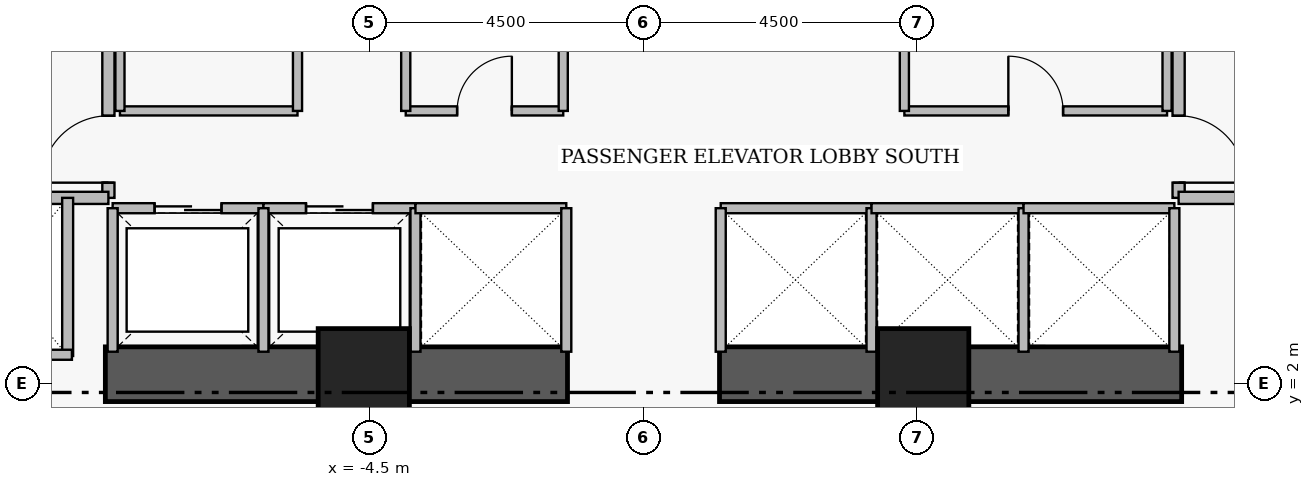
"""IFC4 building model, lengths in metres.
Left out: names, types, materials, properties, quantities, classifications, styles, units other than length and angle.
Written with IfcOpenShell. Run it as: python <this file> out.ifc"""

import sys

from ifc_helpers import new_model, si_unit, direction, frame, frame_2d, origin, origin_2d, place, context, subcontext, project, spatial, rectangle, extrude, element, fill, save


model = new_model("IFC4")
c1 = context("Model", 3, precision=1e-05, world=origin(), true_north=direction((0.0, 1.0)))
c2 = subcontext(c1, "Body", "Model", "MODEL_VIEW")
j1 = project(units=[si_unit("LENGTHUNIT", "METRE"), si_unit("PLANEANGLEUNIT", "RADIAN")], contexts=[c1])
p1 = place(None, origin())
s1 = spatial("IfcSite", under=j1, at=p1, CompositionType="ELEMENT")
p2 = place(p1, origin())
s2 = spatial("IfcBuilding", under=s1, at=p2, CompositionType="ELEMENT")
p3 = place(p2, frame((0.0, 0.0, 27.6)))
s3 = spatial("IfcBuildingStorey", under=s2, at=p3, CompositionType="ELEMENT", Elevation=27.6)
for number, where, z_axis, x_axis in (
    (1, (-8.85, 2.15, 0.0), (0.0, 0.0, 1.0), (1.0, 0.0, 0.0)),
    (2, (1.25, 2.15, 0.0), (0.0, 0.0, 1.0), (1.0, 0.0, 0.0)),
):
    element("IfcWall", number, at=place(p3, frame(where, z_axis=z_axis, x_axis=x_axis)), inside=s3, PredefinedType="SHEAR", context=c2, shape_type="SweptSolid", body=[
        extrude(rectangle(XDim=7.6, YDim=0.9, at=frame_2d((3.8, 0.0))), origin(), (0.0, 0.0, 1.0), 3.43),
    ])
for number, where, z_axis, x_axis in (
    (3, (-4.6, 2.15, 0.0), (0.0, 0.0, 1.0), (1.0, 0.0, 0.0)),
    (4, (4.6, 2.15, 0.0), (0.0, 0.0, 1.0), (1.0, 0.0, 0.0)),
):
    element("IfcColumn", number, at=place(p3, frame(where, z_axis=z_axis, x_axis=x_axis)), inside=s3, PredefinedType="COLUMN", context=c2, shape_type="SweptSolid", body=[
        extrude(rectangle(XDim=1.5, YDim=1.5, at=origin_2d()), origin(), (0.0, 0.0, 1.0), 3.65),
    ])
p4 = place(p3, frame((-8.8, 5.05, 0.0), z_axis=(0.0, 0.0, 1.0), x_axis=(0.0, 1.0, 0.0)))
e5 = element("IfcWall", 5, at=p4, inside=s3, PredefinedType="PARTITIONING", context=c2, shape_type="SweptSolid", body=[
    extrude(rectangle(XDim=6.1, YDim=0.2, at=frame_2d((3.05, 0.0))), origin(), (0.0, 0.0, 1.0), 3.43),
])
p5 = place(p4, frame((0.25, 0.0, 0.0)))
e6 = element("IfcOpeningElement", 6, at=p5, cuts=e5, PredefinedType="OPENING", context=c2, shape_type="SweptSolid", body=[
    extrude(rectangle(XDim=1.1, YDim=2.2, at=frame_2d((0.55, 1.1))), frame((0.0, 0.11, 0.0), z_axis=(0.0, -1.0, 0.0), x_axis=(1.0, 0.0, 0.0)), (0.0, 0.0, 1.0), 0.22),
])
p6 = place(p4, frame((3.85, 0.0, 0.0)))
e7 = element("IfcOpeningElement", 7, at=p6, cuts=e5, PredefinedType="OPENING", context=c2, shape_type="SweptSolid", body=[
    extrude(rectangle(XDim=1.1, YDim=2.2, at=frame_2d((0.55, 1.1))), frame((0.0, 0.11, 0.0), z_axis=(0.0, -1.0, 0.0), x_axis=(1.0, 0.0, 0.0)), (0.0, 0.0, 1.0), 0.22),
])
p7 = place(p3, frame((8.8, 11.15, 0.0), z_axis=(0.0, 0.0, 1.0), x_axis=(0.0, -1.0, 0.0)))
e8 = element("IfcWall", 8, at=p7, inside=s3, PredefinedType="PARTITIONING", context=c2, shape_type="SweptSolid", body=[
    extrude(rectangle(XDim=6.1, YDim=0.2, at=frame_2d((3.05, 0.0))), origin(), (0.0, 0.0, 1.0), 3.43),
])
p8 = place(p7, frame((1.15, 0.0, 0.0)))
e9 = element("IfcOpeningElement", 9, at=p8, cuts=e8, PredefinedType="OPENING", context=c2, shape_type="SweptSolid", body=[
    extrude(rectangle(XDim=1.1, YDim=2.2, at=frame_2d((0.55, 1.1))), frame((0.0, 0.11, 0.0), z_axis=(0.0, -1.0, 0.0), x_axis=(1.0, 0.0, 0.0)), (0.0, 0.0, 1.0), 0.22),
])
p9 = place(p7, frame((4.75, 0.0, 0.0)))
e10 = element("IfcOpeningElement", 10, at=p9, cuts=e8, PredefinedType="OPENING", context=c2, shape_type="SweptSolid", body=[
    extrude(rectangle(XDim=1.1, YDim=2.2, at=frame_2d((0.55, 1.1))), frame((0.0, 0.11, 0.0), z_axis=(0.0, -1.0, 0.0), x_axis=(1.0, 0.0, 0.0)), (0.0, 0.0, 1.0), 0.22),
])
p10 = place(p3, frame((-8.73, 4.88, 0.0), z_axis=(0.0, 0.0, 1.0), x_axis=(1.0, 0.0, 0.0)))
e11 = element("IfcWall", 11, at=p10, inside=s3, PredefinedType="PARTITIONING", context=c2, shape_type="SweptSolid", body=[
    extrude(rectangle(XDim=2.48, YDim=0.165, at=frame_2d((1.24, 0.0))), origin(), (0.0, 0.0, 1.0), 3.43),
])
p11 = place(p10, frame((0.69, 0.0, 0.0)))
e12 = element("IfcOpeningElement", 12, at=p11, cuts=e11, PredefinedType="OPENING", context=c2, shape_type="SweptSolid", body=[
    extrude(rectangle(XDim=1.1, YDim=2.25, at=frame_2d((0.55, 1.125))), frame((0.0, 0.093, 0.0), z_axis=(0.0, -1.0, 0.0), x_axis=(1.0, 0.0, 0.0)), (0.0, 0.0, 1.0), 0.185),
])
p12 = place(p3, frame((-6.25, 4.88, 0.0), z_axis=(0.0, 0.0, 1.0), x_axis=(1.0, 0.0, 0.0)))
e13 = element("IfcWall", 13, at=p12, inside=s3, PredefinedType="PARTITIONING", context=c2, shape_type="SweptSolid", body=[
    extrude(rectangle(XDim=2.5, YDim=0.165, at=frame_2d((1.25, 0.0))), origin(), (0.0, 0.0, 1.0), 3.43),
])
p13 = place(p12, frame((0.7, 0.0, 0.0)))
e14 = element("IfcOpeningElement", 14, at=p13, cuts=e13, PredefinedType="OPENING", context=c2, shape_type="SweptSolid", body=[
    extrude(rectangle(XDim=1.1, YDim=2.25, at=frame_2d((0.55, 1.125))), frame((0.0, 0.093, 0.0), z_axis=(0.0, -1.0, 0.0), x_axis=(1.0, 0.0, 0.0)), (0.0, 0.0, 1.0), 0.185),
])
p14 = place(p3, frame((-3.91, 6.48, 0.0), z_axis=(0.0, 0.0, 1.0), x_axis=(1.0, 0.0, 0.0)))
e15 = element("IfcWall", 15, at=p14, inside=s3, PredefinedType="PARTITIONING", context=c2, shape_type="SweptSolid", body=[
    extrude(rectangle(XDim=2.59, YDim=0.15, at=frame_2d((1.295, 0.0))), origin(), (0.0, 0.0, 1.0), 3.43),
])
p15 = place(p14, frame((0.845, 0.0, 0.0)))
e16 = element("IfcOpeningElement", 16, at=p15, cuts=e15, PredefinedType="OPENING", context=c2, shape_type="SweptSolid", body=[
    extrude(rectangle(XDim=0.9, YDim=2.15, at=frame_2d((0.45, 1.075))), frame((0.0, 0.085, 0.0), z_axis=(0.0, -1.0, 0.0), x_axis=(1.0, 0.0, 0.0)), (0.0, 0.0, 1.0), 0.17),
])
p16 = place(p3, frame((4.29, 6.48, 0.0), z_axis=(0.0, 0.0, 1.0), x_axis=(1.0, 0.0, 0.0)))
e17 = element("IfcWall", 17, at=p16, inside=s3, PredefinedType="PARTITIONING", context=c2, shape_type="SweptSolid", body=[
    extrude(rectangle(XDim=4.32, YDim=0.15, at=frame_2d((2.16, 0.0))), origin(), (0.0, 0.0, 1.0), 3.43),
])
p17 = place(p16, frame((1.71, 0.0, 0.0)))
e18 = element("IfcOpeningElement", 18, at=p17, cuts=e17, PredefinedType="OPENING", context=c2, shape_type="SweptSolid", body=[
    extrude(rectangle(XDim=0.9, YDim=2.15, at=frame_2d((0.45, 1.075))), frame((0.0, 0.085, 0.0), z_axis=(0.0, -1.0, 0.0), x_axis=(1.0, 0.0, 0.0)), (0.0, 0.0, 1.0), 0.17),
])
for number, where, z_axis, x_axis in (
    (19, (-11.65, 5.05, 0.0), (0.0, 0.0, 1.0), (1.0, 0.0, 0.0)),
    (20, (8.8, 5.05, 0.0), (0.0, 0.0, 1.0), (1.0, 0.0, 0.0)),
):
    element("IfcWall", number, at=place(p3, frame(where, z_axis=z_axis, x_axis=x_axis)), inside=s3, PredefinedType="PARTITIONING", context=c2, shape_type="SweptSolid", body=[
        extrude(rectangle(XDim=2.85, YDim=0.2, at=frame_2d((1.425, 0.0))), origin(), (0.0, 0.0, 1.0), 3.43),
    ])
for number, where, z_axis, x_axis in (
    (21, (-8.73, 2.52, 0.0), (0.0, 0.0, 1.0), (0.0, 1.0, 0.0)),
    (22, (-6.25, 2.52, 0.0), (0.0, 0.0, 1.0), (0.0, 1.0, 0.0)),
    (23, (-3.75, 2.52, 0.0), (0.0, 0.0, 1.0), (0.0, 1.0, 0.0)),
):
    element("IfcWall", number, at=place(p3, frame(where, z_axis=z_axis, x_axis=x_axis)), inside=s3, PredefinedType="PARTITIONING", context=c2, shape_type="SweptSolid", body=[
        extrude(rectangle(XDim=2.36, YDim=0.165, at=frame_2d((1.18, 0.0))), origin(), (0.0, 0.0, 1.0), 3.43),
    ])
p18 = place(p3, frame((-3.75, 4.88, 0.0), z_axis=(0.0, 0.0, 1.0), x_axis=(1.0, 0.0, 0.0)))
e24 = element("IfcWall", 24, at=p18, inside=s3, PredefinedType="PARTITIONING", context=c2, shape_type="SweptSolid", body=[
    extrude(rectangle(XDim=2.48, YDim=0.165, at=frame_2d((1.24, 0.0))), origin(), (0.0, 0.0, 1.0), 3.43),
])
p19 = place(p3, frame((-1.27, 2.52, 0.0), z_axis=(0.0, 0.0, 1.0), x_axis=(0.0, 1.0, 0.0)))
e25 = element("IfcWall", 25, at=p19, inside=s3, PredefinedType="PARTITIONING", context=c2, shape_type="SweptSolid", body=[
    extrude(rectangle(XDim=2.36, YDim=0.165, at=frame_2d((1.18, 0.0))), origin(), (0.0, 0.0, 1.0), 3.43),
])
p20 = place(p3, frame((1.27, 4.88, 0.0), z_axis=(0.0, 0.0, 1.0), x_axis=(1.0, 0.0, 0.0)))
e26 = element("IfcWall", 26, at=p20, inside=s3, PredefinedType="PARTITIONING", context=c2, shape_type="SweptSolid", body=[
    extrude(rectangle(XDim=2.48, YDim=0.165, at=frame_2d((1.24, 0.0))), origin(), (0.0, 0.0, 1.0), 3.43),
])
for number, where, z_axis, x_axis in (
    (27, (1.27, 2.52, 0.0), (0.0, 0.0, 1.0), (0.0, 1.0, 0.0)),
    (28, (3.75, 2.52, 0.0), (0.0, 0.0, 1.0), (0.0, 1.0, 0.0)),
):
    element("IfcWall", number, at=place(p3, frame(where, z_axis=z_axis, x_axis=x_axis)), inside=s3, PredefinedType="PARTITIONING", context=c2, shape_type="SweptSolid", body=[
        extrude(rectangle(XDim=2.36, YDim=0.165, at=frame_2d((1.18, 0.0))), origin(), (0.0, 0.0, 1.0), 3.43),
    ])
p21 = place(p3, frame((3.75, 4.88, 0.0), z_axis=(0.0, 0.0, 1.0), x_axis=(1.0, 0.0, 0.0)))
e29 = element("IfcWall", 29, at=p21, inside=s3, PredefinedType="PARTITIONING", context=c2, shape_type="SweptSolid", body=[
    extrude(rectangle(XDim=2.5, YDim=0.165, at=frame_2d((1.25, 0.0))), origin(), (0.0, 0.0, 1.0), 3.43),
])
p22 = place(p3, frame((6.25, 2.52, 0.0), z_axis=(0.0, 0.0, 1.0), x_axis=(0.0, 1.0, 0.0)))
e30 = element("IfcWall", 30, at=p22, inside=s3, PredefinedType="PARTITIONING", context=c2, shape_type="SweptSolid", body=[
    extrude(rectangle(XDim=2.36, YDim=0.165, at=frame_2d((1.18, 0.0))), origin(), (0.0, 0.0, 1.0), 3.43),
])
p23 = place(p3, frame((6.25, 4.88, 0.0), z_axis=(0.0, 0.0, 1.0), x_axis=(1.0, 0.0, 0.0)))
e31 = element("IfcWall", 31, at=p23, inside=s3, PredefinedType="PARTITIONING", context=c2, shape_type="SweptSolid", body=[
    extrude(rectangle(XDim=2.48, YDim=0.165, at=frame_2d((1.24, 0.0))), origin(), (0.0, 0.0, 1.0), 3.43),
])
p24 = place(p3, frame((8.73, 2.52, 0.0), z_axis=(0.0, 0.0, 1.0), x_axis=(0.0, 1.0, 0.0)))
e32 = element("IfcWall", 32, at=p24, inside=s3, PredefinedType="PARTITIONING", context=c2, shape_type="SweptSolid", body=[
    extrude(rectangle(XDim=2.36, YDim=0.165, at=frame_2d((1.18, 0.0))), origin(), (0.0, 0.0, 1.0), 3.43),
])
p25 = place(p3, frame((-9.47, 2.45, 0.0), z_axis=(0.0, 0.0, 1.0), x_axis=(0.0, 1.0, 0.0)))
e33 = element("IfcWall", 33, at=p25, inside=s3, PredefinedType="PARTITIONING", context=c2, shape_type="SweptSolid", body=[
    extrude(rectangle(XDim=2.6, YDim=0.18, at=frame_2d((1.3, 0.0))), origin(), (0.0, 0.0, 1.0), 3.43),
])
p26 = place(p3, frame((-11.71, 2.47, 0.0), z_axis=(0.0, 0.0, 1.0), x_axis=(1.0, 0.0, 0.0)))
e34 = element("IfcWall", 34, at=p26, inside=s3, PredefinedType="PARTITIONING", context=c2, shape_type="SweptSolid", body=[
    extrude(rectangle(XDim=2.31, YDim=0.165, at=frame_2d((1.155, 0.0))), origin(), (0.0, 0.0, 1.0), 2.03),
])
p27 = place(p3, frame((-8.61, 6.48, 0.0), z_axis=(0.0, 0.0, 1.0), x_axis=(1.0, 0.0, 0.0)))
e35 = element("IfcWall", 35, at=p27, inside=s3, PredefinedType="PARTITIONING", context=c2, shape_type="SweptSolid", body=[
    extrude(rectangle(XDim=2.92, YDim=0.15, at=frame_2d((1.46, 0.0))), origin(), (0.0, 0.0, 1.0), 3.43),
])
for number, where, z_axis, x_axis in (
    (36, (-8.61, 6.48, 0.0), (0.0, 0.0, 1.0), (0.0, 1.0, 0.0)),
    (37, (-5.69, 6.48, 0.0), (0.0, 0.0, 1.0), (0.0, 1.0, 0.0)),
    (38, (-3.91, 6.48, 0.0), (0.0, 0.0, 1.0), (0.0, 1.0, 0.0)),
    (39, (-1.32, 6.48, 0.0), (0.0, 0.0, 1.0), (0.0, 1.0, 0.0)),
    (40, (4.29, 6.48, 0.0), (0.0, 0.0, 1.0), (0.0, 1.0, 0.0)),
    (41, (8.61, 6.48, 0.0), (0.0, 0.0, 1.0), (0.0, 1.0, 0.0)),
):
    element("IfcWall", number, at=place(p3, frame(where, z_axis=z_axis, x_axis=x_axis)), inside=s3, PredefinedType="PARTITIONING", context=c2, shape_type="SweptSolid", body=[
        extrude(rectangle(XDim=2.24, YDim=0.15, at=frame_2d((1.12, 0.0))), origin(), (0.0, 0.0, 1.0), 3.43),
    ])
p28 = place(p5, origin())
e42 = element("IfcDoor", 42, at=p28, inside=s3, OperationType="SINGLE_SWING_LEFT", PredefinedType="DOOR", context=c2, shape_type="SweptSolid", body=[
    extrude(rectangle(XDim=1.1, YDim=2.2, at=frame_2d((0.55, 1.1))), frame((0.0, 0.025, 0.0), z_axis=(0.0, -1.0, 0.0), x_axis=(1.0, 0.0, 0.0)), (0.0, 0.0, 1.0), 0.05),
])
fill(e6, e42)
p29 = place(p9, origin())
e43 = element("IfcDoor", 43, at=p29, inside=s3, OperationType="SINGLE_SWING_RIGHT", PredefinedType="DOOR", context=c2, shape_type="SweptSolid", body=[
    extrude(rectangle(XDim=1.1, YDim=2.2, at=frame_2d((0.55, 1.1))), frame((0.0, 0.025, 0.0), z_axis=(0.0, -1.0, 0.0), x_axis=(1.0, 0.0, 0.0)), (0.0, 0.0, 1.0), 0.05),
])
fill(e10, e43)
p30 = place(p11, origin())
e44 = element("IfcDoor", 44, at=p30, inside=s3, OperationType="SLIDING_TO_LEFT", PredefinedType="DOOR", context=c2, shape_type="SweptSolid", body=[
    extrude(rectangle(XDim=1.1, YDim=2.25, at=frame_2d((0.55, 1.125))), frame((0.0, 0.025, 0.0), z_axis=(0.0, -1.0, 0.0), x_axis=(1.0, 0.0, 0.0)), (0.0, 0.0, 1.0), 0.05),
])
fill(e12, e44)
p31 = place(p13, origin())
e45 = element("IfcDoor", 45, at=p31, inside=s3, OperationType="SLIDING_TO_LEFT", PredefinedType="DOOR", context=c2, shape_type="SweptSolid", body=[
    extrude(rectangle(XDim=1.1, YDim=2.25, at=frame_2d((0.55, 1.125))), frame((0.0, 0.025, 0.0), z_axis=(0.0, -1.0, 0.0), x_axis=(1.0, 0.0, 0.0)), (0.0, 0.0, 1.0), 0.05),
])
fill(e14, e45)
p32 = place(p15, origin())
e46 = element("IfcDoor", 46, at=p32, inside=s3, OperationType="SINGLE_SWING_RIGHT", PredefinedType="DOOR", context=c2, shape_type="SweptSolid", body=[
    extrude(rectangle(XDim=0.9, YDim=2.15, at=frame_2d((0.45, 1.075))), frame((0.0, 0.025, 0.0), z_axis=(0.0, -1.0, 0.0), x_axis=(1.0, 0.0, 0.0)), (0.0, 0.0, 1.0), 0.05),
])
fill(e16, e46)
p33 = place(p17, origin())
e47 = element("IfcDoor", 47, at=p33, inside=s3, OperationType="SINGLE_SWING_LEFT", PredefinedType="DOOR", context=c2, shape_type="SweptSolid", body=[
    extrude(rectangle(XDim=0.9, YDim=2.15, at=frame_2d((0.45, 1.075))), frame((0.0, 0.025, 0.0), z_axis=(0.0, -1.0, 0.0), x_axis=(1.0, 0.0, 0.0)), (0.0, 0.0, 1.0), 0.05),
])
fill(e18, e47)
save(model, sys.argv[1])
